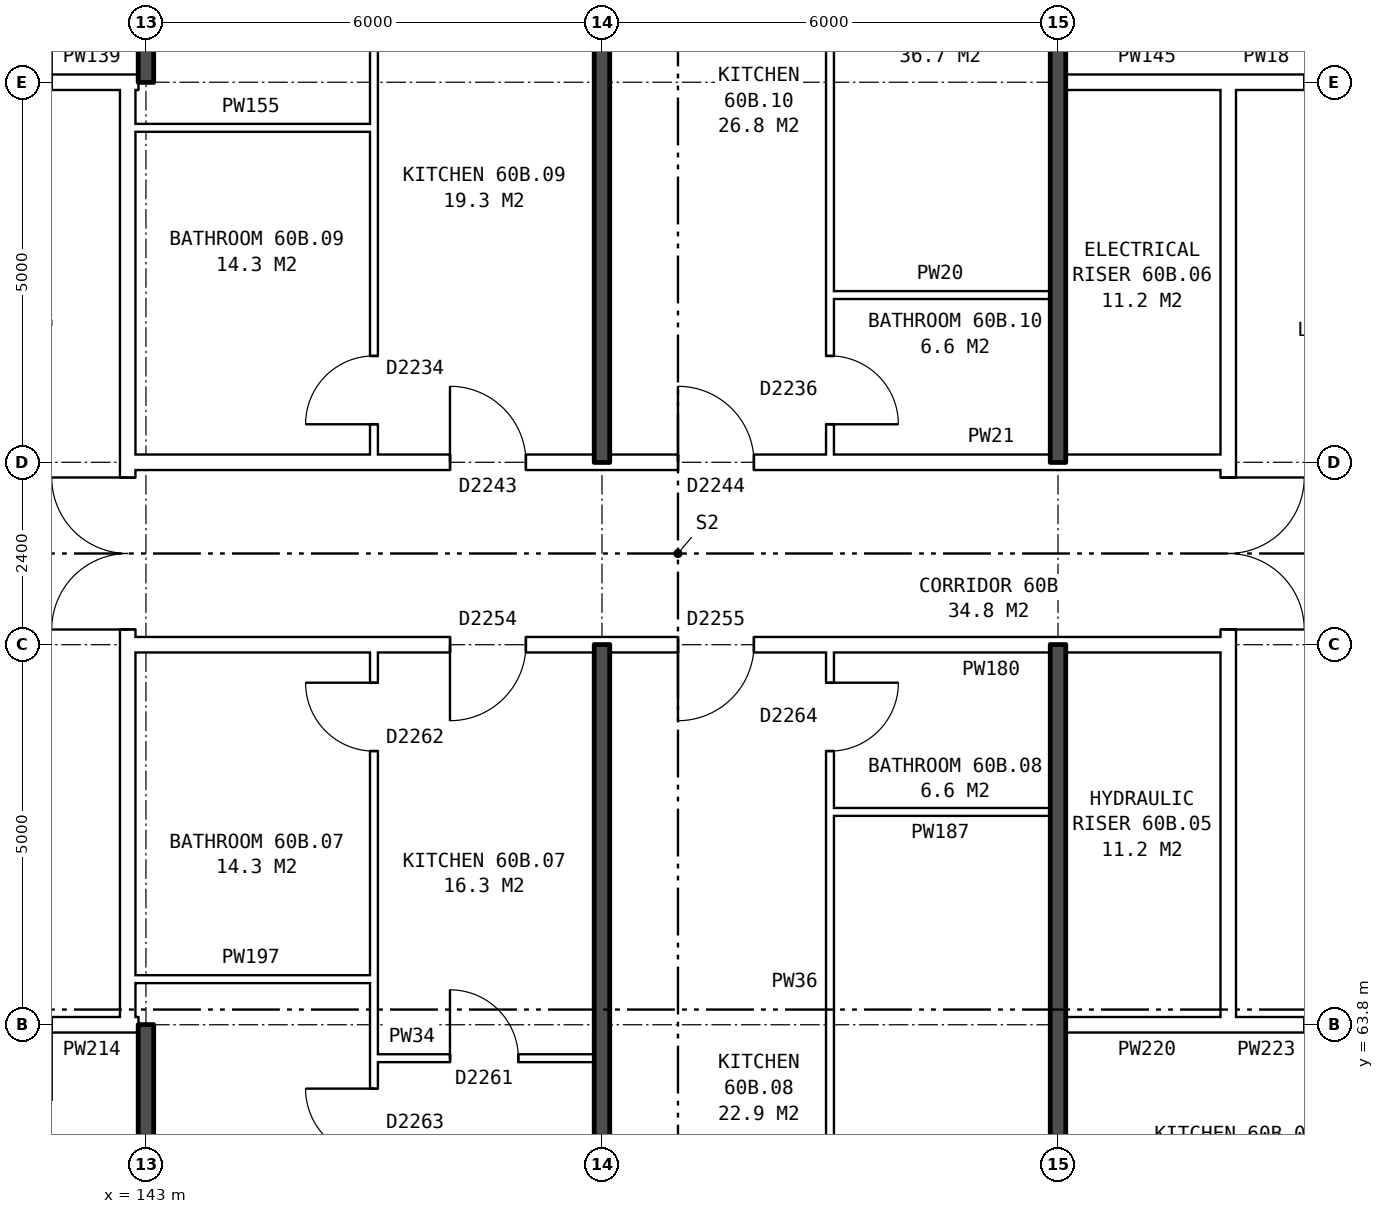
"""IFC4 building model, lengths in metres.
Left out: names, types, materials, properties, quantities, classifications, styles, units other than length and angle.
Written with IfcOpenShell. Run it as: python <this file> out.ifc"""

import sys

from ifc_helpers import new_model, si_unit, direction, frame, frame_2d, origin, place, context, subcontext, project, spatial, rectangle, extrude, element, fill, save


model = new_model("IFC4")
c1 = context("Model", 3, precision=1e-05, world=origin(), true_north=direction((0.0, 1.0)))
c2 = subcontext(c1, "Body", "Model", "MODEL_VIEW")
j1 = project(units=[si_unit("LENGTHUNIT", "METRE"), si_unit("PLANEANGLEUNIT", "RADIAN")], contexts=[c1])
p1 = place(None, origin())
s1 = spatial("IfcSite", under=j1, at=p1, CompositionType="ELEMENT")
p2 = place(p1, origin())
s2 = spatial("IfcBuilding", under=s1, at=p2, CompositionType="ELEMENT")
p3 = place(p2, frame((0.0, 0.0, 212.1)))
s3 = spatial("IfcBuildingStorey", under=s2, at=p3, CompositionType="ELEMENT", Elevation=212.1)
p4 = place(p3, frame((142.76, 63.9, 0.0), z_axis=(0.0, 0.0, 1.0), x_axis=(0.0, 1.0, 0.0)))
e1 = element("IfcWall", 1, at=p4, inside=s3, PredefinedType="PARTITIONING", context=c2, shape_type="SweptSolid", body=[
    extrude(rectangle(XDim=12.2, YDim=0.2, at=frame_2d((6.1, 0.0))), origin(), (0.0, 0.0, 1.0), 2.85),
])
p5 = place(p4, frame((5.1, 0.0, 0.0)))
e2 = element("IfcOpeningElement", 2, at=p5, cuts=e1, PredefinedType="OPENING", context=c2, shape_type="SweptSolid", body=[
    extrude(rectangle(XDim=2.0, YDim=2.1, at=frame_2d((1.0, 1.05))), frame((0.0, 0.11, 0.0), z_axis=(0.0, -1.0, 0.0), x_axis=(1.0, 0.0, 0.0)), (0.0, 0.0, 1.0), 0.22),
])
p6 = place(p3, frame((157.24, 63.9, 0.0), z_axis=(0.0, 0.0, 1.0), x_axis=(0.0, 1.0, 0.0)))
e3 = element("IfcWall", 3, at=p6, inside=s3, PredefinedType="PARTITIONING", context=c2, shape_type="SweptSolid", body=[
    extrude(rectangle(XDim=12.2, YDim=0.2, at=frame_2d((6.1, 0.0))), origin(), (0.0, 0.0, 1.0), 2.85),
])
p7 = place(p6, frame((5.1, 0.0, 0.0)))
e4 = element("IfcOpeningElement", 4, at=p7, cuts=e3, PredefinedType="OPENING", context=c2, shape_type="SweptSolid", body=[
    extrude(rectangle(XDim=2.0, YDim=2.1, at=frame_2d((1.0, 1.05))), frame((0.0, 0.11, 0.0), z_axis=(0.0, -1.0, 0.0), x_axis=(1.0, 0.0, 0.0)), (0.0, 0.0, 1.0), 0.22),
])
p8 = place(p3, frame((146.0, 63.36, 0.0), z_axis=(0.0, 0.0, 1.0), x_axis=(1.0, 0.0, 0.0)))
e5 = element("IfcWall", 5, at=p8, inside=s3, PredefinedType="PARTITIONING", context=c2, shape_type="SweptSolid", body=[
    extrude(rectangle(XDim=2.9, YDim=0.1, at=frame_2d((1.45, 0.0))), origin(), (0.0, 0.0, 1.0), 2.85),
])
p9 = place(p8, frame((1.0, 0.0, 0.0)))
e6 = element("IfcOpeningElement", 6, at=p9, cuts=e5, PredefinedType="OPENING", context=c2, shape_type="SweptSolid", body=[
    extrude(rectangle(XDim=0.9, YDim=2.1, at=frame_2d((0.45, 1.05))), frame((0.0, 0.06, 0.0), z_axis=(0.0, -1.0, 0.0), x_axis=(1.0, 0.0, 0.0)), (0.0, 0.0, 1.0), 0.12),
])
p10 = place(p3, frame((139.76, 63.8, 0.0), z_axis=(0.0, 0.0, 1.0), x_axis=(1.0, 0.0, 0.0)))
e7 = element("IfcWall", 7, at=p10, inside=s3, PredefinedType="PARTITIONING", context=c2, shape_type="SweptSolid", body=[
    extrude(rectangle(XDim=3.0, YDim=0.2, at=frame_2d((1.5, 0.0))), origin(), (0.0, 0.0, 1.0), 2.85),
])
p11 = place(p10, frame((1.0, 0.0, 0.0)))
e8 = element("IfcOpeningElement", 8, at=p11, cuts=e7, PredefinedType="OPENING", context=c2, shape_type="SweptSolid", body=[
    extrude(rectangle(XDim=1.0, YDim=2.1, at=frame_2d((0.5, 1.05))), frame((0.0, 0.11, 0.0), z_axis=(0.0, -1.0, 0.0), x_axis=(1.0, 0.0, 0.0)), (0.0, 0.0, 1.0), 0.22),
])
p12 = place(p3, frame((142.76, 63.8, 0.0), z_axis=(0.0, 0.0, 1.0), x_axis=(1.0, 0.0, 0.0)))
e9 = element("IfcWall", 9, at=p12, inside=s3, PredefinedType="PARTITIONING", context=c2, shape_type="SweptSolid", body=[
    extrude(rectangle(XDim=0.14, YDim=0.2, at=frame_2d((0.07, 0.0))), origin(), (0.0, 0.0, 1.0), 2.85),
])
p13 = place(p3, frame((155.1, 63.8, 0.0), z_axis=(0.0, 0.0, 1.0), x_axis=(1.0, 0.0, 0.0)))
e10 = element("IfcWall", 10, at=p13, inside=s3, PredefinedType="PARTITIONING", context=c2, shape_type="SweptSolid", body=[
    extrude(rectangle(XDim=2.14, YDim=0.2, at=frame_2d((1.07, 0.0))), origin(), (0.0, 0.0, 1.0), 2.85),
])
p14 = place(p3, frame((157.24, 63.8, 0.0), z_axis=(0.0, 0.0, 1.0), x_axis=(1.0, 0.0, 0.0)))
e11 = element("IfcWall", 11, at=p14, inside=s3, PredefinedType="PARTITIONING", context=c2, shape_type="SweptSolid", body=[
    extrude(rectangle(XDim=3.0, YDim=0.2, at=frame_2d((1.5, 0.0))), origin(), (0.0, 0.0, 1.0), 2.85),
])
p15 = place(p14, frame((1.0, 0.0, 0.0)))
e12 = element("IfcOpeningElement", 12, at=p15, cuts=e11, PredefinedType="OPENING", context=c2, shape_type="SweptSolid", body=[
    extrude(rectangle(XDim=1.0, YDim=2.1, at=frame_2d((0.5, 1.05))), frame((0.0, 0.11, 0.0), z_axis=(0.0, -1.0, 0.0), x_axis=(1.0, 0.0, 0.0)), (0.0, 0.0, 1.0), 0.22),
])
p16 = place(p3, frame((142.76, 64.4, 0.0), z_axis=(0.0, 0.0, 1.0), x_axis=(1.0, 0.0, 0.0)))
e13 = element("IfcWall", 13, at=p16, inside=s3, PredefinedType="PARTITIONING", context=c2, shape_type="SweptSolid", body=[
    extrude(rectangle(XDim=3.24, YDim=0.1, at=frame_2d((1.62, 0.0))), origin(), (0.0, 0.0, 1.0), 2.85),
])
p17 = place(p3, frame((152.0, 66.6, 0.0), z_axis=(0.0, 0.0, 1.0), x_axis=(1.0, 0.0, 0.0)))
e14 = element("IfcWall", 14, at=p17, inside=s3, PredefinedType="PARTITIONING", context=c2, shape_type="SweptSolid", body=[
    extrude(rectangle(XDim=2.9, YDim=0.1, at=frame_2d((1.45, 0.0))), origin(), (0.0, 0.0, 1.0), 2.85),
])
p18 = place(p3, frame((142.76, 68.8, 0.0), z_axis=(0.0, 0.0, 1.0), x_axis=(1.0, 0.0, 0.0)))
e15 = element("IfcWall", 15, at=p18, inside=s3, PredefinedType="PARTITIONING", context=c2, shape_type="SweptSolid", body=[
    extrude(rectangle(XDim=14.48, YDim=0.2, at=frame_2d((7.24, 0.0))), origin(), (0.0, 0.0, 1.0), 2.85),
])
p19 = place(p18, frame((4.24, 0.0, 0.0)))
e16 = element("IfcOpeningElement", 16, at=p19, cuts=e15, PredefinedType="OPENING", context=c2, shape_type="SweptSolid", body=[
    extrude(rectangle(XDim=1.0, YDim=2.1, at=frame_2d((0.5, 1.05))), frame((0.0, 0.11, 0.0), z_axis=(0.0, -1.0, 0.0), x_axis=(1.0, 0.0, 0.0)), (0.0, 0.0, 1.0), 0.22),
])
p20 = place(p18, frame((7.24, 0.0, 0.0)))
e17 = element("IfcOpeningElement", 17, at=p20, cuts=e15, PredefinedType="OPENING", context=c2, shape_type="SweptSolid", body=[
    extrude(rectangle(XDim=1.0, YDim=2.1, at=frame_2d((0.5, 1.05))), frame((0.0, 0.11, 0.0), z_axis=(0.0, -1.0, 0.0), x_axis=(1.0, 0.0, 0.0)), (0.0, 0.0, 1.0), 0.22),
])
p21 = place(p3, frame((142.76, 71.2, 0.0), z_axis=(0.0, 0.0, 1.0), x_axis=(1.0, 0.0, 0.0)))
e18 = element("IfcWall", 18, at=p21, inside=s3, PredefinedType="PARTITIONING", context=c2, shape_type="SweptSolid", body=[
    extrude(rectangle(XDim=14.48, YDim=0.2, at=frame_2d((7.24, 0.0))), origin(), (0.0, 0.0, 1.0), 2.85),
])
p22 = place(p21, frame((4.24, 0.0, 0.0)))
e19 = element("IfcOpeningElement", 19, at=p22, cuts=e18, PredefinedType="OPENING", context=c2, shape_type="SweptSolid", body=[
    extrude(rectangle(XDim=1.0, YDim=2.1, at=frame_2d((0.5, 1.05))), frame((0.0, 0.11, 0.0), z_axis=(0.0, -1.0, 0.0), x_axis=(1.0, 0.0, 0.0)), (0.0, 0.0, 1.0), 0.22),
])
p23 = place(p21, frame((7.24, 0.0, 0.0)))
e20 = element("IfcOpeningElement", 20, at=p23, cuts=e18, PredefinedType="OPENING", context=c2, shape_type="SweptSolid", body=[
    extrude(rectangle(XDim=1.0, YDim=2.1, at=frame_2d((0.5, 1.05))), frame((0.0, 0.11, 0.0), z_axis=(0.0, -1.0, 0.0), x_axis=(1.0, 0.0, 0.0)), (0.0, 0.0, 1.0), 0.22),
])
p24 = place(p3, frame((152.0, 73.4, 0.0), z_axis=(0.0, 0.0, 1.0), x_axis=(1.0, 0.0, 0.0)))
e21 = element("IfcWall", 21, at=p24, inside=s3, PredefinedType="PARTITIONING", context=c2, shape_type="SweptSolid", body=[
    extrude(rectangle(XDim=2.9, YDim=0.1, at=frame_2d((1.45, 0.0))), origin(), (0.0, 0.0, 1.0), 2.85),
])
p25 = place(p3, frame((142.76, 75.6, 0.0), z_axis=(0.0, 0.0, 1.0), x_axis=(1.0, 0.0, 0.0)))
e22 = element("IfcWall", 22, at=p25, inside=s3, PredefinedType="PARTITIONING", context=c2, shape_type="SweptSolid", body=[
    extrude(rectangle(XDim=3.24, YDim=0.1, at=frame_2d((1.62, 0.0))), origin(), (0.0, 0.0, 1.0), 2.85),
])
p26 = place(p3, frame((139.76, 76.2, 0.0), z_axis=(0.0, 0.0, 1.0), x_axis=(1.0, 0.0, 0.0)))
e23 = element("IfcWall", 23, at=p26, inside=s3, PredefinedType="PARTITIONING", context=c2, shape_type="SweptSolid", body=[
    extrude(rectangle(XDim=3.0, YDim=0.2, at=frame_2d((1.5, 0.0))), origin(), (0.0, 0.0, 1.0), 2.85),
])
p27 = place(p26, frame((1.0, 0.0, 0.0)))
e24 = element("IfcOpeningElement", 24, at=p27, cuts=e23, PredefinedType="OPENING", context=c2, shape_type="SweptSolid", body=[
    extrude(rectangle(XDim=1.0, YDim=2.1, at=frame_2d((0.5, 1.05))), frame((0.0, 0.11, 0.0), z_axis=(0.0, -1.0, 0.0), x_axis=(1.0, 0.0, 0.0)), (0.0, 0.0, 1.0), 0.22),
])
p28 = place(p3, frame((142.76, 76.2, 0.0), z_axis=(0.0, 0.0, 1.0), x_axis=(1.0, 0.0, 0.0)))
e25 = element("IfcWall", 25, at=p28, inside=s3, PredefinedType="PARTITIONING", context=c2, shape_type="SweptSolid", body=[
    extrude(rectangle(XDim=0.14, YDim=0.2, at=frame_2d((0.07, 0.0))), origin(), (0.0, 0.0, 1.0), 2.85),
])
p29 = place(p3, frame((155.1, 76.2, 0.0), z_axis=(0.0, 0.0, 1.0), x_axis=(1.0, 0.0, 0.0)))
e26 = element("IfcWall", 26, at=p29, inside=s3, PredefinedType="PARTITIONING", context=c2, shape_type="SweptSolid", body=[
    extrude(rectangle(XDim=2.14, YDim=0.2, at=frame_2d((1.07, 0.0))), origin(), (0.0, 0.0, 1.0), 2.85),
])
p30 = place(p3, frame((157.24, 76.2, 0.0), z_axis=(0.0, 0.0, 1.0), x_axis=(1.0, 0.0, 0.0)))
e27 = element("IfcWall", 27, at=p30, inside=s3, PredefinedType="PARTITIONING", context=c2, shape_type="SweptSolid", body=[
    extrude(rectangle(XDim=3.0, YDim=0.2, at=frame_2d((1.5, 0.0))), origin(), (0.0, 0.0, 1.0), 2.85),
])
p31 = place(p30, frame((1.0, 0.0, 0.0)))
e28 = element("IfcOpeningElement", 28, at=p31, cuts=e27, PredefinedType="OPENING", context=c2, shape_type="SweptSolid", body=[
    extrude(rectangle(XDim=1.0, YDim=2.1, at=frame_2d((0.5, 1.05))), frame((0.0, 0.11, 0.0), z_axis=(0.0, -1.0, 0.0), x_axis=(1.0, 0.0, 0.0)), (0.0, 0.0, 1.0), 0.22),
])
for number, where, z_axis, x_axis in (
    (29, (143.0, 54.36, 0.0), (0.0, 0.0, 1.0), (0.0, 1.0, 0.0)),
    (30, (143.0, 76.2, 0.0), (0.0, 0.0, 1.0), (0.0, 1.0, 0.0)),
):
    element("IfcWall", number, at=place(p3, frame(where, z_axis=z_axis, x_axis=x_axis)), inside=s3, PredefinedType="SOLIDWALL", context=c2, shape_type="SweptSolid", body=[
        extrude(rectangle(XDim=9.44, YDim=0.2, at=frame_2d((4.72, 0.0))), origin(), (0.0, 0.0, 1.0), 2.85),
    ])
p32 = place(p3, frame((146.0, 54.36, 0.0), z_axis=(0.0, 0.0, 1.0), x_axis=(0.0, 1.0, 0.0)))
e31 = element("IfcWall", 31, at=p32, inside=s3, PredefinedType="PARTITIONING", context=c2, shape_type="SweptSolid", body=[
    extrude(rectangle(XDim=14.34, YDim=0.1, at=frame_2d((7.17, 0.0))), origin(), (0.0, 0.0, 1.0), 2.85),
])
p33 = place(p32, frame((7.7, 0.0, 0.0)))
e32 = element("IfcOpeningElement", 32, at=p33, cuts=e31, PredefinedType="OPENING", context=c2, shape_type="SweptSolid", body=[
    extrude(rectangle(XDim=0.9, YDim=2.1, at=frame_2d((0.45, 1.05))), frame((0.0, 0.06, 0.0), z_axis=(0.0, -1.0, 0.0), x_axis=(1.0, 0.0, 0.0)), (0.0, 0.0, 1.0), 0.12),
])
p34 = place(p32, frame((13.04, 0.0, 0.0)))
e33 = element("IfcOpeningElement", 33, at=p34, cuts=e31, PredefinedType="OPENING", context=c2, shape_type="SweptSolid", body=[
    extrude(rectangle(XDim=0.9, YDim=2.1, at=frame_2d((0.45, 1.05))), frame((0.0, 0.06, 0.0), z_axis=(0.0, -1.0, 0.0), x_axis=(1.0, 0.0, 0.0)), (0.0, 0.0, 1.0), 0.12),
])
p35 = place(p3, frame((146.0, 71.3, 0.0), z_axis=(0.0, 0.0, 1.0), x_axis=(0.0, 1.0, 0.0)))
e34 = element("IfcWall", 34, at=p35, inside=s3, PredefinedType="PARTITIONING", context=c2, shape_type="SweptSolid", body=[
    extrude(rectangle(XDim=14.34, YDim=0.1, at=frame_2d((7.17, 0.0))), origin(), (0.0, 0.0, 1.0), 2.85),
])
p36 = place(p35, frame((6.74, 0.0, 0.0)))
e35 = element("IfcOpeningElement", 35, at=p36, cuts=e34, PredefinedType="OPENING", context=c2, shape_type="SweptSolid", body=[
    extrude(rectangle(XDim=0.9, YDim=2.1, at=frame_2d((0.45, 1.05))), frame((0.0, 0.06, 0.0), z_axis=(0.0, -1.0, 0.0), x_axis=(1.0, 0.0, 0.0)), (0.0, 0.0, 1.0), 0.12),
])
p37 = place(p35, frame((0.4, 0.0, 0.0)))
e36 = element("IfcOpeningElement", 36, at=p37, cuts=e34, PredefinedType="OPENING", context=c2, shape_type="SweptSolid", body=[
    extrude(rectangle(XDim=0.9, YDim=2.1, at=frame_2d((0.45, 1.05))), frame((0.0, 0.06, 0.0), z_axis=(0.0, -1.0, 0.0), x_axis=(1.0, 0.0, 0.0)), (0.0, 0.0, 1.0), 0.12),
])
for number, where, z_axis, x_axis in (
    (37, (149.0, 54.36, 0.0), (0.0, 0.0, 1.0), (0.0, 1.0, 0.0)),
    (38, (149.0, 71.2, 0.0), (0.0, 0.0, 1.0), (0.0, 1.0, 0.0)),
):
    element("IfcWall", number, at=place(p3, frame(where, z_axis=z_axis, x_axis=x_axis)), inside=s3, PredefinedType="SOLIDWALL", context=c2, shape_type="SweptSolid", body=[
        extrude(rectangle(XDim=14.44, YDim=0.2, at=frame_2d((7.22, 0.0))), origin(), (0.0, 0.0, 1.0), 2.85),
    ])
p38 = place(p3, frame((152.0, 54.36, 0.0), z_axis=(0.0, 0.0, 1.0), x_axis=(0.0, 1.0, 0.0)))
e39 = element("IfcWall", 39, at=p38, inside=s3, PredefinedType="PARTITIONING", context=c2, shape_type="SweptSolid", body=[
    extrude(rectangle(XDim=14.34, YDim=0.1, at=frame_2d((7.17, 0.0))), origin(), (0.0, 0.0, 1.0), 2.85),
])
p39 = place(p38, frame((5.5, 0.0, 0.0)))
e40 = element("IfcOpeningElement", 40, at=p39, cuts=e39, PredefinedType="OPENING", context=c2, shape_type="SweptSolid", body=[
    extrude(rectangle(XDim=0.9, YDim=2.1, at=frame_2d((0.45, 1.05))), frame((0.0, 0.06, 0.0), z_axis=(0.0, -1.0, 0.0), x_axis=(1.0, 0.0, 0.0)), (0.0, 0.0, 1.0), 0.12),
])
p40 = place(p38, frame((13.04, 0.0, 0.0)))
e41 = element("IfcOpeningElement", 41, at=p40, cuts=e39, PredefinedType="OPENING", context=c2, shape_type="SweptSolid", body=[
    extrude(rectangle(XDim=0.9, YDim=2.1, at=frame_2d((0.45, 1.05))), frame((0.0, 0.06, 0.0), z_axis=(0.0, -1.0, 0.0), x_axis=(1.0, 0.0, 0.0)), (0.0, 0.0, 1.0), 0.12),
])
p41 = place(p3, frame((152.0, 71.3, 0.0), z_axis=(0.0, 0.0, 1.0), x_axis=(0.0, 1.0, 0.0)))
e42 = element("IfcWall", 42, at=p41, inside=s3, PredefinedType="PARTITIONING", context=c2, shape_type="SweptSolid", body=[
    extrude(rectangle(XDim=14.34, YDim=0.1, at=frame_2d((7.17, 0.0))), origin(), (0.0, 0.0, 1.0), 2.85),
])
p42 = place(p41, frame((9.24, 0.0, 0.0)))
e43 = element("IfcOpeningElement", 43, at=p42, cuts=e42, PredefinedType="OPENING", context=c2, shape_type="SweptSolid", body=[
    extrude(rectangle(XDim=0.9, YDim=2.1, at=frame_2d((0.45, 1.05))), frame((0.0, 0.06, 0.0), z_axis=(0.0, -1.0, 0.0), x_axis=(1.0, 0.0, 0.0)), (0.0, 0.0, 1.0), 0.12),
])
p43 = place(p41, frame((0.4, 0.0, 0.0)))
e44 = element("IfcOpeningElement", 44, at=p43, cuts=e42, PredefinedType="OPENING", context=c2, shape_type="SweptSolid", body=[
    extrude(rectangle(XDim=0.9, YDim=2.1, at=frame_2d((0.45, 1.05))), frame((0.0, 0.06, 0.0), z_axis=(0.0, -1.0, 0.0), x_axis=(1.0, 0.0, 0.0)), (0.0, 0.0, 1.0), 0.12),
])
for number, where, z_axis, x_axis in (
    (45, (155.0, 54.36, 0.0), (0.0, 0.0, 1.0), (0.0, 1.0, 0.0)),
    (46, (155.0, 71.2, 0.0), (0.0, 0.0, 1.0), (0.0, 1.0, 0.0)),
):
    element("IfcWall", number, at=place(p3, frame(where, z_axis=z_axis, x_axis=x_axis)), inside=s3, PredefinedType="SOLIDWALL", context=c2, shape_type="SweptSolid", body=[
        extrude(rectangle(XDim=14.44, YDim=0.2, at=frame_2d((7.22, 0.0))), origin(), (0.0, 0.0, 1.0), 2.85),
    ])
p44 = place(p5, origin())
e47 = element("IfcDoor", 47, at=p44, inside=s3, OperationType="DOUBLE_DOOR_SINGLE_SWING", PredefinedType="DOOR", context=c2, shape_type="SweptSolid", body=[
    extrude(rectangle(XDim=2.0, YDim=2.1, at=frame_2d((1.0, 1.05))), frame((0.0, 0.025, 0.0), z_axis=(0.0, -1.0, 0.0), x_axis=(1.0, 0.0, 0.0)), (0.0, 0.0, 1.0), 0.05),
])
fill(e2, e47)
p45 = place(p7, frame((2.0, 0.0, 0.0), z_axis=(0.0, 0.0, 1.0), x_axis=(-1.0, 0.0, 0.0)))
e48 = element("IfcDoor", 48, at=p45, inside=s3, OperationType="DOUBLE_DOOR_SINGLE_SWING", PredefinedType="DOOR", context=c2, shape_type="SweptSolid", body=[
    extrude(rectangle(XDim=2.0, YDim=2.1, at=frame_2d((1.0, 1.05))), frame((0.0, 0.025, 0.0), z_axis=(0.0, -1.0, 0.0), x_axis=(1.0, 0.0, 0.0)), (0.0, 0.0, 1.0), 0.05),
])
fill(e4, e48)
p46 = place(p33, origin())
e49 = element("IfcDoor", 49, at=p46, inside=s3, OperationType="SINGLE_SWING_RIGHT", PredefinedType="DOOR", context=c2, shape_type="SweptSolid", body=[
    extrude(rectangle(XDim=0.9, YDim=2.1, at=frame_2d((0.45, 1.05))), frame((0.0, 0.025, 0.0), z_axis=(0.0, -1.0, 0.0), x_axis=(1.0, 0.0, 0.0)), (0.0, 0.0, 1.0), 0.05),
])
fill(e32, e49)
p47 = place(p19, frame((1.0, 0.0, 0.0), z_axis=(0.0, 0.0, 1.0), x_axis=(-1.0, 0.0, 0.0)))
e50 = element("IfcDoor", 50, at=p47, inside=s3, OperationType="SINGLE_SWING_RIGHT", PredefinedType="DOOR", context=c2, shape_type="SweptSolid", body=[
    extrude(rectangle(XDim=1.0, YDim=2.1, at=frame_2d((0.5, 1.05))), frame((0.0, 0.025, 0.0), z_axis=(0.0, -1.0, 0.0), x_axis=(1.0, 0.0, 0.0)), (0.0, 0.0, 1.0), 0.05),
])
fill(e16, e50)
p48 = place(p9, origin())
e51 = element("IfcDoor", 51, at=p48, inside=s3, OperationType="SINGLE_SWING_LEFT", PredefinedType="DOOR", context=c2, shape_type="SweptSolid", body=[
    extrude(rectangle(XDim=0.9, YDim=2.1, at=frame_2d((0.45, 1.05))), frame((0.0, 0.025, 0.0), z_axis=(0.0, -1.0, 0.0), x_axis=(1.0, 0.0, 0.0)), (0.0, 0.0, 1.0), 0.05),
])
fill(e6, e51)
p49 = place(p34, origin())
e52 = element("IfcDoor", 52, at=p49, inside=s3, OperationType="SINGLE_SWING_RIGHT", PredefinedType="DOOR", context=c2, shape_type="SweptSolid", body=[
    extrude(rectangle(XDim=0.9, YDim=2.1, at=frame_2d((0.45, 1.05))), frame((0.0, 0.025, 0.0), z_axis=(0.0, -1.0, 0.0), x_axis=(1.0, 0.0, 0.0)), (0.0, 0.0, 1.0), 0.05),
])
fill(e33, e52)
p50 = place(p20, frame((1.0, 0.0, 0.0), z_axis=(0.0, 0.0, 1.0), x_axis=(-1.0, 0.0, 0.0)))
e53 = element("IfcDoor", 53, at=p50, inside=s3, OperationType="SINGLE_SWING_RIGHT", PredefinedType="DOOR", context=c2, shape_type="SweptSolid", body=[
    extrude(rectangle(XDim=1.0, YDim=2.1, at=frame_2d((0.5, 1.05))), frame((0.0, 0.025, 0.0), z_axis=(0.0, -1.0, 0.0), x_axis=(1.0, 0.0, 0.0)), (0.0, 0.0, 1.0), 0.05),
])
fill(e17, e53)
p51 = place(p40, frame((0.9, 0.0, 0.0), z_axis=(0.0, 0.0, 1.0), x_axis=(-1.0, 0.0, 0.0)))
e54 = element("IfcDoor", 54, at=p51, inside=s3, OperationType="SINGLE_SWING_LEFT", PredefinedType="DOOR", context=c2, shape_type="SweptSolid", body=[
    extrude(rectangle(XDim=0.9, YDim=2.1, at=frame_2d((0.45, 1.05))), frame((0.0, 0.025, 0.0), z_axis=(0.0, -1.0, 0.0), x_axis=(1.0, 0.0, 0.0)), (0.0, 0.0, 1.0), 0.05),
])
fill(e41, e54)
p52 = place(p22, origin())
e55 = element("IfcDoor", 55, at=p52, inside=s3, OperationType="SINGLE_SWING_LEFT", PredefinedType="DOOR", context=c2, shape_type="SweptSolid", body=[
    extrude(rectangle(XDim=1.0, YDim=2.1, at=frame_2d((0.5, 1.05))), frame((0.0, 0.025, 0.0), z_axis=(0.0, -1.0, 0.0), x_axis=(1.0, 0.0, 0.0)), (0.0, 0.0, 1.0), 0.05),
])
fill(e19, e55)
p53 = place(p37, origin())
e56 = element("IfcDoor", 56, at=p53, inside=s3, OperationType="SINGLE_SWING_LEFT", PredefinedType="DOOR", context=c2, shape_type="SweptSolid", body=[
    extrude(rectangle(XDim=0.9, YDim=2.1, at=frame_2d((0.45, 1.05))), frame((0.0, 0.025, 0.0), z_axis=(0.0, -1.0, 0.0), x_axis=(1.0, 0.0, 0.0)), (0.0, 0.0, 1.0), 0.05),
])
fill(e36, e56)
p54 = place(p23, origin())
e57 = element("IfcDoor", 57, at=p54, inside=s3, OperationType="SINGLE_SWING_LEFT", PredefinedType="DOOR", context=c2, shape_type="SweptSolid", body=[
    extrude(rectangle(XDim=1.0, YDim=2.1, at=frame_2d((0.5, 1.05))), frame((0.0, 0.025, 0.0), z_axis=(0.0, -1.0, 0.0), x_axis=(1.0, 0.0, 0.0)), (0.0, 0.0, 1.0), 0.05),
])
fill(e20, e57)
p55 = place(p43, frame((0.9, 0.0, 0.0), z_axis=(0.0, 0.0, 1.0), x_axis=(-1.0, 0.0, 0.0)))
e58 = element("IfcDoor", 58, at=p55, inside=s3, OperationType="SINGLE_SWING_RIGHT", PredefinedType="DOOR", context=c2, shape_type="SweptSolid", body=[
    extrude(rectangle(XDim=0.9, YDim=2.1, at=frame_2d((0.45, 1.05))), frame((0.0, 0.025, 0.0), z_axis=(0.0, -1.0, 0.0), x_axis=(1.0, 0.0, 0.0)), (0.0, 0.0, 1.0), 0.05),
])
fill(e44, e58)
save(model, sys.argv[1])
